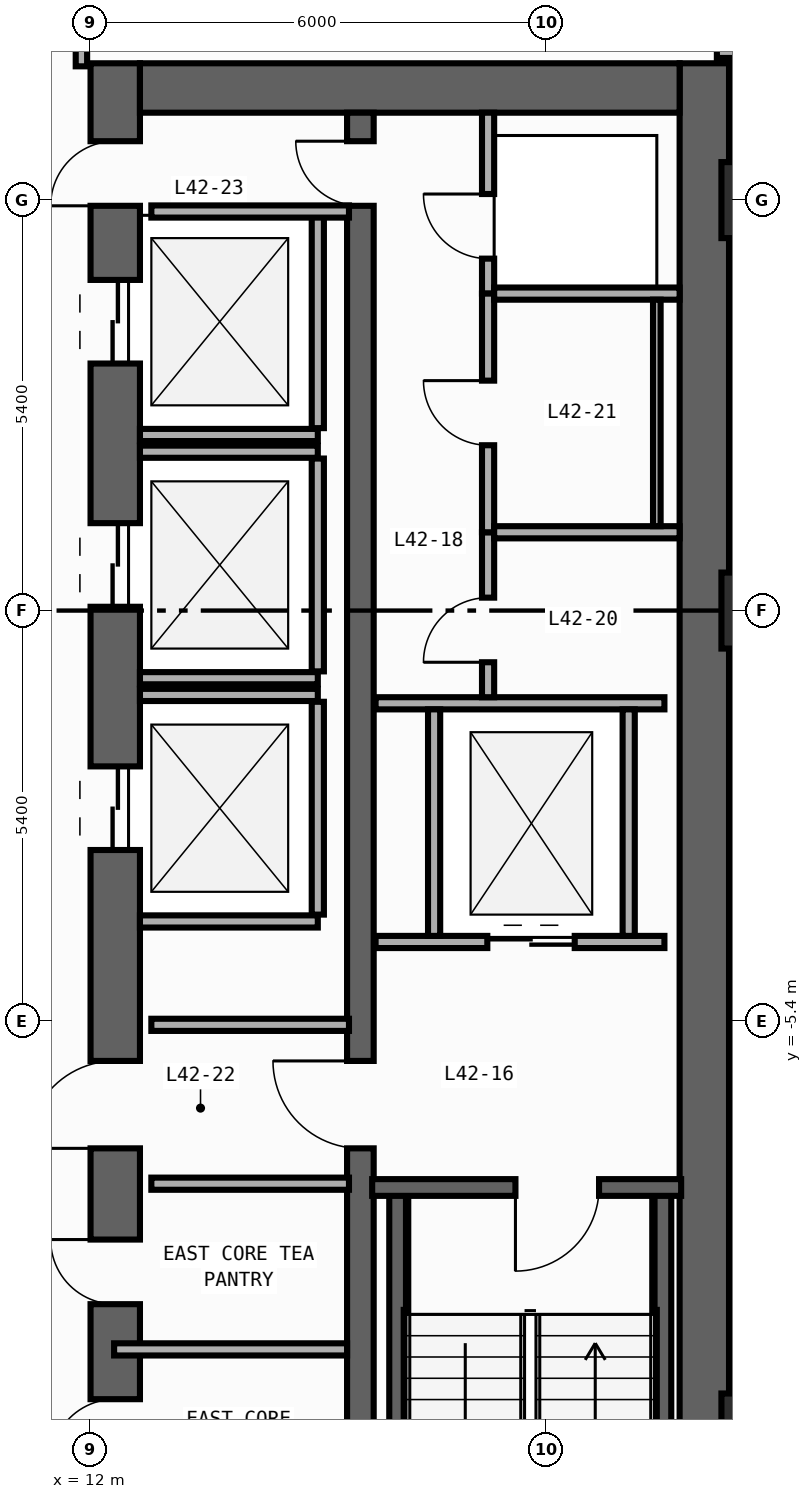
"""IFC4 building model, lengths in metres.
Left out: names, types, materials, properties, quantities, classifications, styles, units other than length and angle.
Written with IfcOpenShell. Run it as: python <this file> out.ifc"""

import sys

from ifc_helpers import new_model, si_unit, direction, frame, frame_2d, origin, origin_2d, place, context, subcontext, project, spatial, rectangle, extrude, element, fill, save


model = new_model("IFC4")
c1 = context("Model", 3, precision=1e-05, world=origin(), true_north=direction((0.0, 1.0)))
c2 = subcontext(c1, "Body", "Model", "MODEL_VIEW")
j1 = project(units=[si_unit("LENGTHUNIT", "METRE"), si_unit("PLANEANGLEUNIT", "RADIAN")], contexts=[c1])
p1 = place(None, origin())
s1 = spatial("IfcSite", under=j1, at=p1, CompositionType="ELEMENT")
p2 = place(p1, origin())
s2 = spatial("IfcBuilding", under=s1, at=p2, CompositionType="ELEMENT")
p3 = place(p2, frame((0.0, 0.0, 184.0)))
s3 = spatial("IfcBuildingStorey", under=s2, at=p3, CompositionType="ELEMENT", Elevation=184.0)
p4 = place(p3, frame((12.325, -19.8, 0.0), z_axis=(0.0, 0.0, 1.0), x_axis=(0.0, 1.0, 0.0)))
e1 = element("IfcWall", 1, at=p4, inside=s3, PredefinedType="SHEAR", context=c2, shape_type="SweptSolid", body=[
    extrude(rectangle(XDim=27.0, YDim=0.65, at=frame_2d((13.5, 0.0))), origin(), (0.0, 0.0, 1.0), 3.54),
])
p5 = place(p4, frame((23.05, 0.0, 0.0)))
e2 = element("IfcOpeningElement", 2, at=p5, cuts=e1, PredefinedType="OPENING", context=c2, shape_type="SweptSolid", body=[
    extrude(rectangle(XDim=1.1, YDim=2.2, at=frame_2d((0.55, 1.1))), frame((0.0, 0.335, 0.0), z_axis=(0.0, -1.0, 0.0), x_axis=(1.0, 0.0, 0.0)), (0.0, 0.0, 1.0), 0.67),
])
p6 = place(p4, frame((19.85, 0.0, 0.0)))
e3 = element("IfcOpeningElement", 3, at=p6, cuts=e1, PredefinedType="OPENING", context=c2, shape_type="SweptSolid", body=[
    extrude(rectangle(XDim=1.1, YDim=2.2, at=frame_2d((0.55, 1.1))), frame((0.0, 0.335, 0.0), z_axis=(0.0, -1.0, 0.0), x_axis=(1.0, 0.0, 0.0)), (0.0, 0.0, 1.0), 0.67),
])
p7 = place(p4, frame((16.65, 0.0, 0.0)))
e4 = element("IfcOpeningElement", 4, at=p7, cuts=e1, PredefinedType="OPENING", context=c2, shape_type="SweptSolid", body=[
    extrude(rectangle(XDim=1.1, YDim=2.2, at=frame_2d((0.55, 1.1))), frame((0.0, 0.335, 0.0), z_axis=(0.0, -1.0, 0.0), x_axis=(1.0, 0.0, 0.0)), (0.0, 0.0, 1.0), 0.67),
])
p8 = place(p4, frame((6.275, 0.0, 0.0)))
e5 = element("IfcOpeningElement", 5, at=p8, cuts=e1, PredefinedType="OPENING", context=c2, shape_type="SweptSolid", body=[
    extrude(rectangle(XDim=0.85, YDim=2.1, at=frame_2d((0.425, 1.05))), frame((0.0, 0.335, 0.0), z_axis=(0.0, -1.0, 0.0), x_axis=(1.0, 0.0, 0.0)), (0.0, 0.0, 1.0), 0.67),
])
p9 = place(p4, frame((8.575, 0.0, 0.0)))
e6 = element("IfcOpeningElement", 6, at=p9, cuts=e1, PredefinedType="OPENING", context=c2, shape_type="SweptSolid", body=[
    extrude(rectangle(XDim=0.85, YDim=2.1, at=frame_2d((0.425, 1.05))), frame((0.0, 0.335, 0.0), z_axis=(0.0, -1.0, 0.0), x_axis=(1.0, 0.0, 0.0)), (0.0, 0.0, 1.0), 0.67),
])
p10 = place(p4, frame((10.675, 0.0, 0.0)))
e7 = element("IfcOpeningElement", 7, at=p10, cuts=e1, PredefinedType="OPENING", context=c2, shape_type="SweptSolid", body=[
    extrude(rectangle(XDim=0.85, YDim=2.1, at=frame_2d((0.425, 1.05))), frame((0.0, 0.335, 0.0), z_axis=(0.0, -1.0, 0.0), x_axis=(1.0, 0.0, 0.0)), (0.0, 0.0, 1.0), 0.67),
])
p11 = place(p4, frame((12.725, 0.0, 0.0)))
e8 = element("IfcOpeningElement", 8, at=p11, cuts=e1, PredefinedType="OPENING", context=c2, shape_type="SweptSolid", body=[
    extrude(rectangle(XDim=1.15, YDim=2.2, at=frame_2d((0.575, 1.1))), frame((0.0, 0.335, 0.0), z_axis=(0.0, -1.0, 0.0), x_axis=(1.0, 0.0, 0.0)), (0.0, 0.0, 1.0), 0.67),
])
p12 = place(p4, frame((25.125, 0.0, 0.0)))
e9 = element("IfcOpeningElement", 9, at=p12, cuts=e1, PredefinedType="OPENING", context=c2, shape_type="SweptSolid", body=[
    extrude(rectangle(XDim=0.85, YDim=2.1, at=frame_2d((0.425, 1.05))), frame((0.0, 0.335, 0.0), z_axis=(0.0, -1.0, 0.0), x_axis=(1.0, 0.0, 0.0)), (0.0, 0.0, 1.0), 0.67),
])
p13 = place(p3, frame((20.075, -19.8, 0.0), z_axis=(0.0, 0.0, 1.0), x_axis=(0.0, 1.0, 0.0)))
e10 = element("IfcWall", 10, at=p13, inside=s3, PredefinedType="SHEAR", context=c2, shape_type="SweptSolid", body=[
    extrude(rectangle(XDim=27.0, YDim=0.65, at=frame_2d((13.5, 0.0))), origin(), (0.0, 0.0, 1.0), 3.54),
])
p14 = place(p3, frame((12.65, 6.875, 0.0), z_axis=(0.0, 0.0, 1.0), x_axis=(1.0, 0.0, 0.0)))
e11 = element("IfcWall", 11, at=p14, inside=s3, PredefinedType="SHEAR", context=c2, shape_type="SweptSolid", body=[
    extrude(rectangle(XDim=7.1, YDim=0.65, at=frame_2d((3.55, 0.0))), origin(), (0.0, 0.0, 1.0), 3.54),
])
p15 = place(p3, frame((15.55, -19.15, 0.0), z_axis=(0.0, 0.0, 1.0), x_axis=(0.0, 1.0, 0.0)))
e12 = element("IfcWall", 12, at=p15, inside=s3, PredefinedType="SHEAR", context=c2, shape_type="SweptSolid", body=[
    extrude(rectangle(XDim=25.7, YDim=0.35, at=frame_2d((12.85, 0.0))), origin(), (0.0, 0.0, 1.0), 3.54),
])
p16 = place(p15, frame((12.075, 0.0, 0.0)))
e13 = element("IfcOpeningElement", 13, at=p16, cuts=e12, PredefinedType="OPENING", context=c2, shape_type="SweptSolid", body=[
    extrude(rectangle(XDim=1.15, YDim=2.2, at=frame_2d((0.575, 1.1))), frame((0.0, 0.185, 0.0), z_axis=(0.0, -1.0, 0.0), x_axis=(1.0, 0.0, 0.0)), (0.0, 0.0, 1.0), 0.37),
])
p17 = place(p15, frame((24.475, 0.0, 0.0)))
e14 = element("IfcOpeningElement", 14, at=p17, cuts=e12, PredefinedType="OPENING", context=c2, shape_type="SweptSolid", body=[
    extrude(rectangle(XDim=0.85, YDim=2.1, at=frame_2d((0.425, 1.05))), frame((0.0, 0.185, 0.0), z_axis=(0.0, -1.0, 0.0), x_axis=(1.0, 0.0, 0.0)), (0.0, 0.0, 1.0), 0.37),
])
for number, where, z_axis, x_axis in (
    (15, (16.04, -19.01, 0.0), (0.0, 0.0, 1.0), (0.0, 1.0, 0.0)),
    (16, (19.53, -19.01, 0.0), (0.0, 0.0, 1.0), (0.0, 1.0, 0.0)),
):
    element("IfcWall", number, at=place(p3, frame(where, z_axis=z_axis, x_axis=x_axis)), inside=s3, PredefinedType="SHEAR", context=c2, shape_type="SweptSolid", body=[
        extrude(rectangle(XDim=11.42, YDim=0.22, at=frame_2d((5.71, 0.0))), origin(), (0.0, 0.0, 1.0), 3.54),
    ])
p18 = place(p3, frame((19.77, -7.59, 0.0), z_axis=(0.0, 0.0, 1.0), x_axis=(-1.0, 0.0, 0.0)))
e17 = element("IfcWall", 17, at=p18, inside=s3, PredefinedType="SHEAR", context=c2, shape_type="SweptSolid", body=[
    extrude(rectangle(XDim=4.065, YDim=0.22, at=frame_2d((2.032, 0.0))), origin(), (0.0, 0.0, 1.0), 3.54),
])
p19 = place(p18, frame((1.08, 0.0, 0.0)))
e18 = element("IfcOpeningElement", 18, at=p19, cuts=e17, PredefinedType="OPENING", context=c2, shape_type="SweptSolid", body=[
    extrude(rectangle(XDim=1.1, YDim=2.2, at=frame_2d((0.55, 1.1))), frame((0.0, 0.12, 0.0), z_axis=(0.0, -1.0, 0.0), x_axis=(1.0, 0.0, 0.0)), (0.0, 0.0, 1.0), 0.24),
])
for number, where, z_axis, x_axis in (
    (19, (20.8, -10.8, 0.0), (0.0, 0.0, 1.0), (1.0, 0.0, 0.0)),
    (20, (20.8, 0.0, 0.0), (0.0, 0.0, 1.0), (1.0, 0.0, 0.0)),
    (21, (20.8, 5.4, 0.0), (0.0, 0.0, 1.0), (1.0, 0.0, 0.0)),
):
    element("IfcColumn", number, at=place(p3, frame(where, z_axis=z_axis, x_axis=x_axis)), inside=s3, PredefinedType="COLUMN", context=c2, shape_type="SweptSolid", body=[
        extrude(rectangle(XDim=1.0, YDim=1.0, at=origin_2d()), origin(), (0.0, 0.0, 1.0), 3.8),
    ])
p20 = place(p3, frame((12.65, 2.31, 0.0), z_axis=(0.0, 0.0, 1.0), x_axis=(1.0, 0.0, 0.0)))
e22 = element("IfcWall", 22, at=p20, inside=s3, PredefinedType="STANDARD", context=c2, shape_type="SweptSolid", body=[
    extrude(rectangle(XDim=2.34, YDim=0.16, at=frame_2d((1.17, 0.0))), origin(), (0.0, 0.0, 1.0), 3.54),
])
p21 = place(p3, frame((14.99, 2.4, 0.0), z_axis=(0.0, 0.0, 1.0), x_axis=(0.0, 1.0, 0.0)))
e23 = element("IfcWall", 23, at=p21, inside=s3, PredefinedType="STANDARD", context=c2, shape_type="SweptSolid", body=[
    extrude(rectangle(XDim=2.8, YDim=0.16, at=frame_2d((1.4, 0.0))), origin(), (0.0, 0.0, 1.0), 3.54),
])
for number, where, z_axis, x_axis in (
    (24, (12.65, -0.89, 0.0), (0.0, 0.0, 1.0), (1.0, 0.0, 0.0)),
    (25, (12.65, 2.09, 0.0), (0.0, 0.0, 1.0), (1.0, 0.0, 0.0)),
):
    element("IfcWall", number, at=place(p3, frame(where, z_axis=z_axis, x_axis=x_axis)), inside=s3, PredefinedType="STANDARD", context=c2, shape_type="SweptSolid", body=[
        extrude(rectangle(XDim=2.34, YDim=0.16, at=frame_2d((1.17, 0.0))), origin(), (0.0, 0.0, 1.0), 3.54),
    ])
p22 = place(p3, frame((14.99, -0.8, 0.0), z_axis=(0.0, 0.0, 1.0), x_axis=(0.0, 1.0, 0.0)))
e26 = element("IfcWall", 26, at=p22, inside=s3, PredefinedType="STANDARD", context=c2, shape_type="SweptSolid", body=[
    extrude(rectangle(XDim=2.8, YDim=0.16, at=frame_2d((1.4, 0.0))), origin(), (0.0, 0.0, 1.0), 3.54),
])
for number, where, z_axis, x_axis in (
    (27, (12.65, -4.09, 0.0), (0.0, 0.0, 1.0), (1.0, 0.0, 0.0)),
    (28, (12.65, -1.11, 0.0), (0.0, 0.0, 1.0), (1.0, 0.0, 0.0)),
):
    element("IfcWall", number, at=place(p3, frame(where, z_axis=z_axis, x_axis=x_axis)), inside=s3, PredefinedType="STANDARD", context=c2, shape_type="SweptSolid", body=[
        extrude(rectangle(XDim=2.34, YDim=0.16, at=frame_2d((1.17, 0.0))), origin(), (0.0, 0.0, 1.0), 3.54),
    ])
p23 = place(p3, frame((14.99, -4.0, 0.0), z_axis=(0.0, 0.0, 1.0), x_axis=(0.0, 1.0, 0.0)))
e29 = element("IfcWall", 29, at=p23, inside=s3, PredefinedType="STANDARD", context=c2, shape_type="SweptSolid", body=[
    extrude(rectangle(XDim=2.8, YDim=0.16, at=frame_2d((1.4, 0.0))), origin(), (0.0, 0.0, 1.0), 3.54),
])
p24 = place(p3, frame((15.75, -4.36, 0.0), z_axis=(0.0, 0.0, 1.0), x_axis=(1.0, 0.0, 0.0)))
e30 = element("IfcWall", 30, at=p24, inside=s3, PredefinedType="STANDARD", context=c2, shape_type="SweptSolid", body=[
    extrude(rectangle(XDim=3.8, YDim=0.16, at=frame_2d((1.9, 0.0))), origin(), (0.0, 0.0, 1.0), 3.54),
])
p25 = place(p24, frame((1.47, 0.0, 0.0)))
e31 = element("IfcOpeningElement", 31, at=p25, cuts=e30, PredefinedType="OPENING", context=c2, shape_type="SweptSolid", body=[
    extrude(rectangle(XDim=1.15, YDim=2.2, at=frame_2d((0.575, 1.1))), frame((0.0, 0.09, 0.0), z_axis=(0.0, -1.0, 0.0), x_axis=(1.0, 0.0, 0.0)), (0.0, 0.0, 1.0), 0.18),
])
p26 = place(p3, frame((15.75, -1.22, 0.0), z_axis=(0.0, 0.0, 1.0), x_axis=(1.0, 0.0, 0.0)))
e32 = element("IfcWall", 32, at=p26, inside=s3, PredefinedType="STANDARD", context=c2, shape_type="SweptSolid", body=[
    extrude(rectangle(XDim=3.8, YDim=0.16, at=frame_2d((1.9, 0.0))), origin(), (0.0, 0.0, 1.0), 3.54),
])
for number, where, z_axis, x_axis in (
    (33, (16.52, -4.28, 0.0), (0.0, 0.0, 1.0), (0.0, 1.0, 0.0)),
    (34, (19.08, -4.28, 0.0), (0.0, 0.0, 1.0), (0.0, 1.0, 0.0)),
):
    element("IfcWall", number, at=place(p3, frame(where, z_axis=z_axis, x_axis=x_axis)), inside=s3, PredefinedType="STANDARD", context=c2, shape_type="SweptSolid", body=[
        extrude(rectangle(XDim=2.98, YDim=0.16, at=frame_2d((1.49, 0.0))), origin(), (0.0, 0.0, 1.0), 3.54),
    ])
for number, where, z_axis, x_axis in (
    (35, (12.8, -5.45, 0.0), (0.0, 0.0, 1.0), (1.0, 0.0, 0.0)),
    (36, (12.8, -7.54, 0.0), (0.0, 0.0, 1.0), (1.0, 0.0, 0.0)),
    (37, (12.8, 5.25, 0.0), (0.0, 0.0, 1.0), (1.0, 0.0, 0.0)),
):
    element("IfcWall", number, at=place(p3, frame(where, z_axis=z_axis, x_axis=x_axis)), inside=s3, PredefinedType="STANDARD", context=c2, shape_type="SweptSolid", body=[
        extrude(rectangle(XDim=2.6, YDim=0.16, at=frame_2d((1.3, 0.0))), origin(), (0.0, 0.0, 1.0), 3.54),
    ])
p27 = place(p3, frame((17.23, 4.17, 0.0), z_axis=(0.0, 0.0, 1.0), x_axis=(0.0, 1.0, 0.0)))
e38 = element("IfcWall", 38, at=p27, inside=s3, PredefinedType="PARTITIONING", context=c2, shape_type="SweptSolid", body=[
    extrude(rectangle(XDim=2.38, YDim=0.16, at=frame_2d((1.19, 0.0))), origin(), (0.0, 0.0, 1.0), 3.54),
])
p28 = place(p27, frame((0.46, 0.0, 0.0)))
e39 = element("IfcOpeningElement", 39, at=p28, cuts=e38, PredefinedType="OPENING", context=c2, shape_type="SweptSolid", body=[
    extrude(rectangle(XDim=0.85, YDim=2.1, at=frame_2d((0.425, 1.05))), frame((0.0, 0.09, 0.0), z_axis=(0.0, -1.0, 0.0), x_axis=(1.0, 0.0, 0.0)), (0.0, 0.0, 1.0), 0.18),
])
p29 = place(p3, frame((17.23, -1.14, 0.0), z_axis=(0.0, 0.0, 1.0), x_axis=(0.0, 1.0, 0.0)))
e40 = element("IfcWall", 40, at=p29, inside=s3, PredefinedType="PARTITIONING", context=c2, shape_type="SweptSolid", body=[
    extrude(rectangle(XDim=2.17, YDim=0.16, at=frame_2d((1.085, 0.0))), origin(), (0.0, 0.0, 1.0), 3.54),
])
p30 = place(p29, frame((0.46, 0.0, 0.0)))
e41 = element("IfcOpeningElement", 41, at=p30, cuts=e40, PredefinedType="OPENING", context=c2, shape_type="SweptSolid", body=[
    extrude(rectangle(XDim=0.85, YDim=2.1, at=frame_2d((0.425, 1.05))), frame((0.0, 0.09, 0.0), z_axis=(0.0, -1.0, 0.0), x_axis=(1.0, 0.0, 0.0)), (0.0, 0.0, 1.0), 0.18),
])
p31 = place(p3, frame((17.23, 1.03, 0.0), z_axis=(0.0, 0.0, 1.0), x_axis=(0.0, 1.0, 0.0)))
e42 = element("IfcWall", 42, at=p31, inside=s3, PredefinedType="PARTITIONING", context=c2, shape_type="SweptSolid", body=[
    extrude(rectangle(XDim=3.14, YDim=0.16, at=frame_2d((1.57, 0.0))), origin(), (0.0, 0.0, 1.0), 3.54),
])
p32 = place(p31, frame((1.145, 0.0, 0.0)))
e43 = element("IfcOpeningElement", 43, at=p32, cuts=e42, PredefinedType="OPENING", context=c2, shape_type="SweptSolid", body=[
    extrude(rectangle(XDim=0.85, YDim=2.1, at=frame_2d((0.425, 1.05))), frame((0.0, 0.09, 0.0), z_axis=(0.0, -1.0, 0.0), x_axis=(1.0, 0.0, 0.0)), (0.0, 0.0, 1.0), 0.18),
])
for number, where, z_axis, x_axis in (
    (44, (17.31, 4.17, 0.0), (0.0, 0.0, 1.0), (1.0, 0.0, 0.0)),
    (45, (17.31, 1.03, 0.0), (0.0, 0.0, 1.0), (1.0, 0.0, 0.0)),
):
    element("IfcWall", number, at=place(p3, frame(where, z_axis=z_axis, x_axis=x_axis)), inside=s3, PredefinedType="PARTITIONING", context=c2, shape_type="SweptSolid", body=[
        extrude(rectangle(XDim=2.44, YDim=0.16, at=frame_2d((1.22, 0.0))), origin(), (0.0, 0.0, 1.0), 3.54),
    ])
p33 = place(p3, frame((12.31, -9.72, 0.0), z_axis=(0.0, 0.0, 1.0), x_axis=(1.0, 0.0, 0.0)))
e46 = element("IfcWall", 46, at=p33, inside=s3, PredefinedType="PARTITIONING", context=c2, shape_type="SweptSolid", body=[
    extrude(rectangle(XDim=3.065, YDim=0.16, at=frame_2d((1.532, 0.0))), origin(), (0.0, 0.0, 1.0), 3.54),
])
p34 = place(p3, frame((11.88, 7.16, 0.0), z_axis=(0.0, 0.0, 1.0), x_axis=(0.0, 1.0, 0.0)))
e47 = element("IfcWall", 47, at=p34, inside=s3, PredefinedType="PARTITIONING", context=c2, shape_type="SweptSolid", body=[
    extrude(rectangle(XDim=9.055, YDim=0.15, at=frame_2d((4.528, 0.0))), origin(), (0.0, 0.0, 1.0), 3.54),
])
p35 = place(p34, frame((0.46, 0.0, 0.0)))
e48 = element("IfcOpeningElement", 48, at=p35, cuts=e47, PredefinedType="OPENING", context=c2, shape_type="SweptSolid", body=[
    extrude(rectangle(XDim=0.9, YDim=2.15, at=frame_2d((0.45, 1.075))), frame((0.0, 0.085, 0.0), z_axis=(0.0, -1.0, 0.0), x_axis=(1.0, 0.0, 0.0)), (0.0, 0.0, 1.0), 0.17),
])
p36 = place(p3, frame((20.24, 7.34, 0.0), z_axis=(0.0, 0.0, 1.0), x_axis=(1.0, 0.0, 0.0)))
e49 = element("IfcWall", 49, at=p36, inside=s3, PredefinedType="PARTITIONING", context=c2, shape_type="SweptSolid", body=[
    extrude(rectangle(XDim=2.215, YDim=0.14, at=frame_2d((1.107, 0.0))), origin(), (0.0, 0.0, 1.0), 3.54),
])
p37 = place(p36, frame((0.905, 0.0, 0.0)))
e50 = element("IfcOpeningElement", 50, at=p37, cuts=e49, PredefinedType="OPENING", context=c2, shape_type="SweptSolid", body=[
    extrude(rectangle(XDim=0.85, YDim=2.1, at=frame_2d((0.425, 1.05))), frame((0.0, 0.08, 0.0), z_axis=(0.0, -1.0, 0.0), x_axis=(1.0, 0.0, 0.0)), (0.0, 0.0, 1.0), 0.16),
])
p38 = place(p3, frame((19.45, 4.09, 0.0), z_axis=(0.0, 0.0, 1.0), x_axis=(0.0, -1.0, 0.0)))
e51 = element("IfcWall", 51, at=p38, inside=s3, PredefinedType="PARTITIONING", context=c2, shape_type="SweptSolid", body=[
    extrude(rectangle(XDim=2.98, YDim=0.1, at=frame_2d((1.49, 0.0))), origin(), (0.0, 0.0, 1.0), 3.54),
])
p39 = place(p19, origin())
e52 = element("IfcDoor", 52, at=p39, inside=s3, OperationType="SINGLE_SWING_RIGHT", PredefinedType="DOOR", context=c2, shape_type="SweptSolid", body=[
    extrude(rectangle(XDim=1.1, YDim=2.2, at=frame_2d((0.55, 1.1))), frame((0.0, 0.025, 0.0), z_axis=(0.0, -1.0, 0.0), x_axis=(1.0, 0.0, 0.0)), (0.0, 0.0, 1.0), 0.05),
])
fill(e18, e52)
p40 = place(p5, origin())
e53 = element("IfcDoor", 53, at=p40, inside=s3, OperationType="DOUBLE_DOOR_SLIDING", PredefinedType="DOOR", context=c2, shape_type="SweptSolid", body=[
    extrude(rectangle(XDim=1.1, YDim=2.2, at=frame_2d((0.55, 1.1))), frame((0.0, 0.025, 0.0), z_axis=(0.0, -1.0, 0.0), x_axis=(1.0, 0.0, 0.0)), (0.0, 0.0, 1.0), 0.05),
])
fill(e2, e53)
p41 = place(p6, origin())
e54 = element("IfcDoor", 54, at=p41, inside=s3, OperationType="DOUBLE_DOOR_SLIDING", PredefinedType="DOOR", context=c2, shape_type="SweptSolid", body=[
    extrude(rectangle(XDim=1.1, YDim=2.2, at=frame_2d((0.55, 1.1))), frame((0.0, 0.025, 0.0), z_axis=(0.0, -1.0, 0.0), x_axis=(1.0, 0.0, 0.0)), (0.0, 0.0, 1.0), 0.05),
])
fill(e3, e54)
p42 = place(p7, origin())
e55 = element("IfcDoor", 55, at=p42, inside=s3, OperationType="DOUBLE_DOOR_SLIDING", PredefinedType="DOOR", context=c2, shape_type="SweptSolid", body=[
    extrude(rectangle(XDim=1.1, YDim=2.2, at=frame_2d((0.55, 1.1))), frame((0.0, 0.025, 0.0), z_axis=(0.0, -1.0, 0.0), x_axis=(1.0, 0.0, 0.0)), (0.0, 0.0, 1.0), 0.05),
])
fill(e4, e55)
p43 = place(p9, origin())
e56 = element("IfcDoor", 56, at=p43, inside=s3, OperationType="SINGLE_SWING_LEFT", PredefinedType="DOOR", context=c2, shape_type="SweptSolid", body=[
    extrude(rectangle(XDim=0.85, YDim=2.1, at=frame_2d((0.425, 1.05))), frame((0.0, 0.025, 0.0), z_axis=(0.0, -1.0, 0.0), x_axis=(1.0, 0.0, 0.0)), (0.0, 0.0, 1.0), 0.05),
])
fill(e6, e56)
p44 = place(p10, origin())
e57 = element("IfcDoor", 57, at=p44, inside=s3, OperationType="SINGLE_SWING_RIGHT", PredefinedType="DOOR", context=c2, shape_type="SweptSolid", body=[
    extrude(rectangle(XDim=0.85, YDim=2.1, at=frame_2d((0.425, 1.05))), frame((0.0, 0.025, 0.0), z_axis=(0.0, -1.0, 0.0), x_axis=(1.0, 0.0, 0.0)), (0.0, 0.0, 1.0), 0.05),
])
fill(e7, e57)
p45 = place(p11, origin())
e58 = element("IfcDoor", 58, at=p45, inside=s3, OperationType="SINGLE_SWING_LEFT", PredefinedType="DOOR", context=c2, shape_type="SweptSolid", body=[
    extrude(rectangle(XDim=1.15, YDim=2.2, at=frame_2d((0.575, 1.1))), frame((0.0, 0.025, 0.0), z_axis=(0.0, -1.0, 0.0), x_axis=(1.0, 0.0, 0.0)), (0.0, 0.0, 1.0), 0.05),
])
fill(e8, e58)
p46 = place(p16, origin())
e59 = element("IfcDoor", 59, at=p46, inside=s3, OperationType="SINGLE_SWING_RIGHT", PredefinedType="DOOR", context=c2, shape_type="SweptSolid", body=[
    extrude(rectangle(XDim=1.15, YDim=2.2, at=frame_2d((0.575, 1.1))), frame((0.0, 0.025, 0.0), z_axis=(0.0, -1.0, 0.0), x_axis=(1.0, 0.0, 0.0)), (0.0, 0.0, 1.0), 0.05),
])
fill(e13, e59)
p47 = place(p12, origin())
e60 = element("IfcDoor", 60, at=p47, inside=s3, OperationType="SINGLE_SWING_LEFT", PredefinedType="DOOR", context=c2, shape_type="SweptSolid", body=[
    extrude(rectangle(XDim=0.85, YDim=2.1, at=frame_2d((0.425, 1.05))), frame((0.0, 0.025, 0.0), z_axis=(0.0, -1.0, 0.0), x_axis=(1.0, 0.0, 0.0)), (0.0, 0.0, 1.0), 0.05),
])
fill(e9, e60)
p48 = place(p17, origin())
e61 = element("IfcDoor", 61, at=p48, inside=s3, OperationType="SINGLE_SWING_RIGHT", PredefinedType="DOOR", context=c2, shape_type="SweptSolid", body=[
    extrude(rectangle(XDim=0.85, YDim=2.1, at=frame_2d((0.425, 1.05))), frame((0.0, 0.025, 0.0), z_axis=(0.0, -1.0, 0.0), x_axis=(1.0, 0.0, 0.0)), (0.0, 0.0, 1.0), 0.05),
])
fill(e14, e61)
p49 = place(p25, origin())
e62 = element("IfcDoor", 62, at=p49, inside=s3, OperationType="DOUBLE_DOOR_SLIDING", PredefinedType="DOOR", context=c2, shape_type="SweptSolid", body=[
    extrude(rectangle(XDim=1.15, YDim=2.2, at=frame_2d((0.575, 1.1))), frame((0.0, 0.025, 0.0), z_axis=(0.0, -1.0, 0.0), x_axis=(1.0, 0.0, 0.0)), (0.0, 0.0, 1.0), 0.05),
])
fill(e31, e62)
p50 = place(p28, origin())
e63 = element("IfcDoor", 63, at=p50, inside=s3, OperationType="SINGLE_SWING_RIGHT", PredefinedType="DOOR", context=c2, shape_type="SweptSolid", body=[
    extrude(rectangle(XDim=0.85, YDim=2.1, at=frame_2d((0.425, 1.05))), frame((0.0, 0.025, 0.0), z_axis=(0.0, -1.0, 0.0), x_axis=(1.0, 0.0, 0.0)), (0.0, 0.0, 1.0), 0.05),
])
fill(e39, e63)
p51 = place(p30, origin())
e64 = element("IfcDoor", 64, at=p51, inside=s3, OperationType="SINGLE_SWING_LEFT", PredefinedType="DOOR", context=c2, shape_type="SweptSolid", body=[
    extrude(rectangle(XDim=0.85, YDim=2.1, at=frame_2d((0.425, 1.05))), frame((0.0, 0.025, 0.0), z_axis=(0.0, -1.0, 0.0), x_axis=(1.0, 0.0, 0.0)), (0.0, 0.0, 1.0), 0.05),
])
fill(e41, e64)
p52 = place(p32, origin())
e65 = element("IfcDoor", 65, at=p52, inside=s3, OperationType="SINGLE_SWING_RIGHT", PredefinedType="DOOR", context=c2, shape_type="SweptSolid", body=[
    extrude(rectangle(XDim=0.85, YDim=2.1, at=frame_2d((0.425, 1.05))), frame((0.0, 0.025, 0.0), z_axis=(0.0, -1.0, 0.0), x_axis=(1.0, 0.0, 0.0)), (0.0, 0.0, 1.0), 0.05),
])
fill(e43, e65)
save(model, sys.argv[1])
